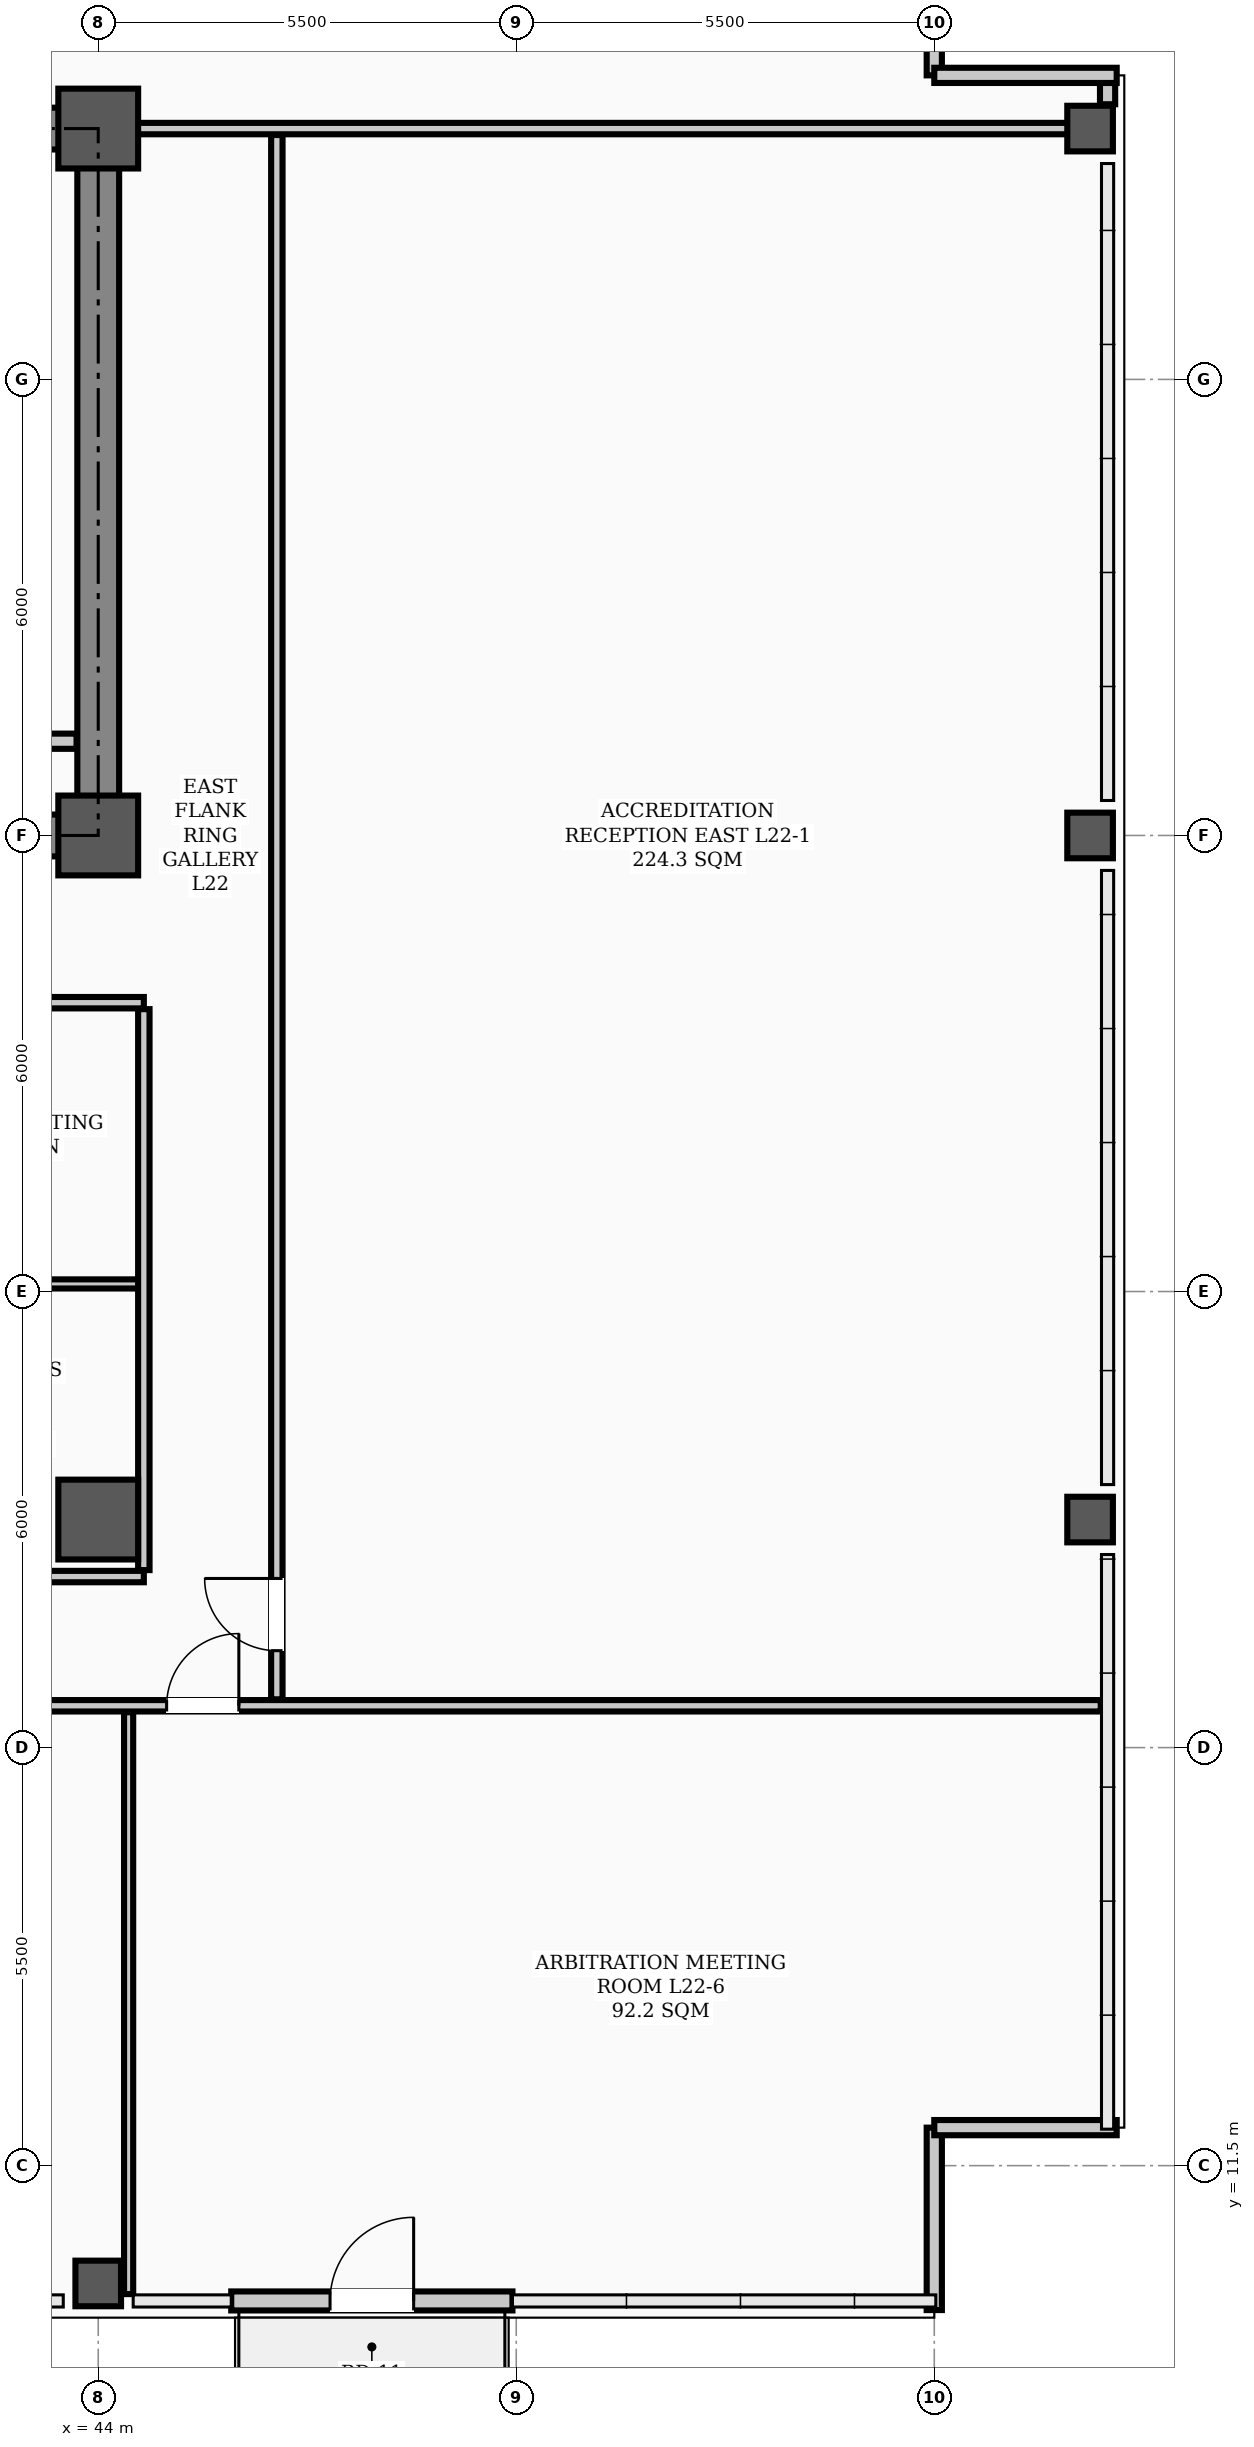
"""IFC4 building model, lengths in metres.
Left out: names, types, materials, properties, quantities, classifications, styles, units other than length and angle.
Written with IfcOpenShell. Run it as: python <this file> out.ifc"""

import sys

from ifc_helpers import new_model, si_unit, direction, frame, frame_2d, origin, origin_2d, place, context, subcontext, project, spatial, rectangle, hollow_rectangle, extrude, element, fill, save


model = new_model("IFC4")
c1 = context("Model", 3, precision=1e-05, world=origin(), true_north=direction((0.0, 1.0)))
c2 = subcontext(c1, "Body", "Model", "MODEL_VIEW")
j1 = project(units=[si_unit("LENGTHUNIT", "METRE"), si_unit("PLANEANGLEUNIT", "RADIAN")], contexts=[c1])
p1 = place(None, origin())
s1 = spatial("IfcSite", under=j1, at=p1, CompositionType="ELEMENT")
p2 = place(p1, origin())
s2 = spatial("IfcBuilding", under=s1, at=p2, CompositionType="ELEMENT")
p3 = place(p2, frame((0.0, 0.0, 88.9)))
s3 = spatial("IfcBuildingStorey", under=s2, at=p3, CompositionType="ELEMENT", Elevation=88.9)
for number, where, z_axis, x_axis in (
    (1, (44.0, 29.0, 0.0), (0.0, 0.0, 1.0), (1.0, 0.0, 0.0)),
    (2, (44.0, 38.3, 0.0), (0.0, 0.0, 1.0), (1.0, 0.0, 0.0)),
    (3, (44.0, 20.0, 0.0), (0.0, 0.0, 1.0), (1.0, 0.0, 0.0)),
):
    element("IfcColumn", number, at=place(p3, frame(where, z_axis=z_axis, x_axis=x_axis)), inside=s3, PredefinedType="COLUMN", context=c2, shape_type="SweptSolid", body=[
        extrude(hollow_rectangle(XDim=1.05, YDim=1.05, WallThickness=0.038, InnerFilletRadius=0.019, OuterFilletRadius=0.057, at=origin_2d()), origin(), (0.0, 0.0, 1.0), 3.9),
    ])
for number, where, z_axis, x_axis in (
    (4, (44.0, 9.95, 0.0), (0.0, 0.0, 1.0), (1.0, 0.0, 0.0)),
    (5, (57.05, 20.0, 0.0), (0.0, 0.0, 1.0), (1.0, 0.0, 0.0)),
    (6, (57.05, 29.0, 0.0), (0.0, 0.0, 1.0), (1.0, 0.0, 0.0)),
    (7, (57.05, 38.3, 0.0), (0.0, 0.0, 1.0), (1.0, 0.0, 0.0)),
):
    element("IfcColumn", number, at=place(p3, frame(where, z_axis=z_axis, x_axis=x_axis)), inside=s3, PredefinedType="COLUMN", context=c2, shape_type="SweptSolid", body=[
        extrude(hollow_rectangle(XDim=0.6, YDim=0.6, WallThickness=0.026, InnerFilletRadius=0.013, OuterFilletRadius=0.039, at=origin_2d()), origin(), (0.0, 0.0, 1.0), 3.9),
    ])
p4 = place(p3, frame((57.28, 38.62, 0.0), z_axis=(0.0, 0.0, 1.0), x_axis=(0.0, 1.0, 0.0)))
e8 = element("IfcWall", 8, at=p4, inside=s3, PredefinedType="PARAPET", context=c2, shape_type="SweptSolid", body=[
    extrude(rectangle(XDim=0.28, YDim=0.2, at=frame_2d((0.14, 0.0))), origin(), (0.0, 0.0, 1.0), 1.2),
])
for number, where, z_axis, x_axis in (
    (9, (55.0, 9.6, 0.0), (0.0, 0.0, 1.0), (0.0, 1.0, 0.0)),
    (10, (55.0, 12.0, 0.0), (0.0, 0.0, 1.0), (1.0, 0.0, 0.0)),
    (11, (55.0, 41.4, 0.0), (0.0, 0.0, 1.0), (0.0, -1.0, 0.0)),
    (12, (55.0, 39.0, 0.0), (0.0, 0.0, 1.0), (1.0, 0.0, 0.0)),
):
    element("IfcWall", number, at=place(p3, frame(where, z_axis=z_axis, x_axis=x_axis)), inside=s3, PredefinedType="PARAPET", context=c2, shape_type="SweptSolid", body=[
        extrude(rectangle(XDim=2.4, YDim=0.2, at=frame_2d((1.2, 0.0))), origin(), (0.0, 0.0, 1.0), 1.2),
    ])
p5 = place(p3, frame((45.75, 9.72, 0.0), z_axis=(0.0, 0.0, 1.0), x_axis=(1.0, 0.0, 0.0)))
e13 = element("IfcWall", 13, at=p5, inside=s3, PredefinedType="STANDARD", context=c2, shape_type="SweptSolid", body=[
    extrude(rectangle(XDim=3.7, YDim=0.25, at=frame_2d((1.85, 0.0))), origin(), (0.0, 0.0, 1.0), 3.18),
])
p6 = place(p5, frame((1.3, 0.0, 0.0)))
e14 = element("IfcOpeningElement", 14, at=p6, cuts=e13, PredefinedType="OPENING", context=c2, shape_type="SweptSolid", body=[
    extrude(rectangle(XDim=1.1, YDim=2.2, at=frame_2d((0.55, 1.1))), frame((0.0, 0.135, 0.0), z_axis=(0.0, -1.0, 0.0), x_axis=(1.0, 0.0, 0.0)), (0.0, 0.0, 1.0), 0.27),
])
p7 = place(p3, frame((13.5, 29.0, 0.0), z_axis=(0.0, 0.0, 1.0), x_axis=(1.0, 0.0, 0.0)))
e15 = element("IfcWall", 15, at=p7, inside=s3, PredefinedType="SHEAR", context=c2, shape_type="SweptSolid", body=[
    extrude(rectangle(XDim=30.5, YDim=0.55, at=frame_2d((15.25, 0.0))), origin(), (0.0, 0.0, 1.0), 3.72),
])
p8 = place(p7, frame((1.75, 0.0, 0.0)))
e16 = element("IfcOpeningElement", 16, at=p8, cuts=e15, PredefinedType="OPENING", context=c2, shape_type="SweptSolid", body=[
    extrude(rectangle(XDim=1.1, YDim=2.08, at=frame_2d((0.55, 1.04))), frame((0.0, 0.285, 0.0), z_axis=(0.0, -1.0, 0.0), x_axis=(1.0, 0.0, 0.0)), (0.0, 0.0, 1.0), 0.57),
])
p9 = place(p7, frame((26.7, 0.0, 0.0)))
e17 = element("IfcOpeningElement", 17, at=p9, cuts=e15, PredefinedType="OPENING", context=c2, shape_type="SweptSolid", body=[
    extrude(rectangle(XDim=1.1, YDim=2.08, at=frame_2d((0.55, 1.04))), frame((0.0, 0.285, 0.0), z_axis=(0.0, -1.0, 0.0), x_axis=(1.0, 0.0, 0.0)), (0.0, 0.0, 1.0), 0.57),
])
p10 = place(p7, frame((6.8, 0.0, 0.0)))
e18 = element("IfcOpeningElement", 18, at=p10, cuts=e15, PredefinedType="OPENING", context=c2, shape_type="SweptSolid", body=[
    extrude(rectangle(XDim=1.1, YDim=2.08, at=frame_2d((0.55, 1.04))), frame((0.0, 0.285, 0.0), z_axis=(0.0, -1.0, 0.0), x_axis=(1.0, 0.0, 0.0)), (0.0, 0.0, 1.0), 0.57),
])
p11 = place(p7, frame((13.2, 0.0, 0.0)))
e19 = element("IfcOpeningElement", 19, at=p11, cuts=e15, PredefinedType="OPENING", context=c2, shape_type="SweptSolid", body=[
    extrude(rectangle(XDim=1.6, YDim=2.08, at=frame_2d((0.8, 1.04))), frame((0.0, 0.285, 0.0), z_axis=(0.0, -1.0, 0.0), x_axis=(1.0, 0.0, 0.0)), (0.0, 0.0, 1.0), 0.57),
])
p12 = place(p7, frame((20.525, 0.0, 0.0)))
e20 = element("IfcOpeningElement", 20, at=p12, cuts=e15, PredefinedType="OPENING", context=c2, shape_type="SweptSolid", body=[
    extrude(rectangle(XDim=0.95, YDim=2.08, at=frame_2d((0.475, 1.04))), frame((0.0, 0.285, 0.0), z_axis=(0.0, -1.0, 0.0), x_axis=(1.0, 0.0, 0.0)), (0.0, 0.0, 1.0), 0.57),
])
p13 = place(p3, frame((13.5, 38.3, 0.0), z_axis=(0.0, 0.0, 1.0), x_axis=(1.0, 0.0, 0.0)))
e21 = element("IfcWall", 21, at=p13, inside=s3, PredefinedType="SHEAR", context=c2, shape_type="SweptSolid", body=[
    extrude(rectangle(XDim=30.5, YDim=0.55, at=frame_2d((15.25, 0.0))), origin(), (0.0, 0.0, 1.0), 3.72),
])
p14 = place(p3, frame((44.0, 29.35, 0.0), z_axis=(0.0, 0.0, 1.0), x_axis=(0.0, 1.0, 0.0)))
e22 = element("IfcWall", 22, at=p14, inside=s3, PredefinedType="SHEAR", context=c2, shape_type="SweptSolid", body=[
    extrude(rectangle(XDim=8.6, YDim=0.55, at=frame_2d((4.3, 0.0))), origin(), (0.0, 0.0, 1.0), 3.72),
])
p15 = place(p3, frame((42.4, 30.24, 0.0), z_axis=(0.0, 0.0, 1.0), x_axis=(1.0, 0.0, 0.0)))
e23 = element("IfcWall", 23, at=p15, inside=s3, PredefinedType="STANDARD", context=c2, shape_type="SweptSolid", body=[
    extrude(rectangle(XDim=1.315, YDim=0.2, at=frame_2d((0.658, 0.0))), origin(), (0.0, 0.0, 1.0), 3.1),
])
p16 = place(p3, frame((12.9, 26.8, 0.0), z_axis=(0.0, 0.0, 1.0), x_axis=(1.0, 0.0, 0.0)))
e24 = element("IfcWall", 24, at=p16, inside=s3, PredefinedType="PARTITIONING", context=c2, shape_type="SweptSolid", body=[
    extrude(rectangle(XDim=31.7, YDim=0.15, at=frame_2d((15.85, 0.0))), origin(), (0.0, 0.0, 1.0), 3.1),
])
p17 = place(p16, frame((13.6, 0.0, 0.0)))
e25 = element("IfcOpeningElement", 25, at=p17, cuts=e24, PredefinedType="OPENING", context=c2, shape_type="SweptSolid", body=[
    extrude(rectangle(XDim=1.6, YDim=2.08, at=frame_2d((0.8, 1.04))), frame((0.0, 0.085, 0.0), z_axis=(0.0, -1.0, 0.0), x_axis=(1.0, 0.0, 0.0)), (0.0, 0.0, 1.0), 0.17),
])
p18 = place(p16, frame((3.275, 0.0, 0.0)))
e26 = element("IfcOpeningElement", 26, at=p18, cuts=e24, PredefinedType="OPENING", context=c2, shape_type="SweptSolid", body=[
    extrude(rectangle(XDim=0.95, YDim=2.08, at=frame_2d((0.475, 1.04))), frame((0.0, 0.085, 0.0), z_axis=(0.0, -1.0, 0.0), x_axis=(1.0, 0.0, 0.0)), (0.0, 0.0, 1.0), 0.17),
])
p19 = place(p16, frame((9.025, 0.0, 0.0)))
e27 = element("IfcOpeningElement", 27, at=p19, cuts=e24, PredefinedType="OPENING", context=c2, shape_type="SweptSolid", body=[
    extrude(rectangle(XDim=0.95, YDim=2.08, at=frame_2d((0.475, 1.04))), frame((0.0, 0.085, 0.0), z_axis=(0.0, -1.0, 0.0), x_axis=(1.0, 0.0, 0.0)), (0.0, 0.0, 1.0), 0.17),
])
p20 = place(p16, frame((19.525, 0.0, 0.0)))
e28 = element("IfcOpeningElement", 28, at=p20, cuts=e24, PredefinedType="OPENING", context=c2, shape_type="SweptSolid", body=[
    extrude(rectangle(XDim=0.95, YDim=2.08, at=frame_2d((0.475, 1.04))), frame((0.0, 0.085, 0.0), z_axis=(0.0, -1.0, 0.0), x_axis=(1.0, 0.0, 0.0)), (0.0, 0.0, 1.0), 0.17),
])
p21 = place(p16, frame((26.725, 0.0, 0.0)))
e29 = element("IfcOpeningElement", 29, at=p21, cuts=e24, PredefinedType="OPENING", context=c2, shape_type="SweptSolid", body=[
    extrude(rectangle(XDim=0.95, YDim=2.08, at=frame_2d((0.475, 1.04))), frame((0.0, 0.085, 0.0), z_axis=(0.0, -1.0, 0.0), x_axis=(1.0, 0.0, 0.0)), (0.0, 0.0, 1.0), 0.17),
])
p22 = place(p3, frame((7.81, 17.55, 0.0), z_axis=(0.0, 0.0, 1.0), x_axis=(1.0, 0.0, 0.0)))
e30 = element("IfcWall", 30, at=p22, inside=s3, PredefinedType="PARTITIONING", context=c2, shape_type="SweptSolid", body=[
    extrude(rectangle(XDim=49.38, YDim=0.15, at=frame_2d((24.69, 0.0))), origin(), (0.0, 0.0, 1.0), 3.1),
])
p23 = place(p22, frame((7.465, 0.0, 0.0)))
e31 = element("IfcOpeningElement", 31, at=p23, cuts=e30, PredefinedType="OPENING", context=c2, shape_type="SweptSolid", body=[
    extrude(rectangle(XDim=0.95, YDim=2.08, at=frame_2d((0.475, 1.04))), frame((0.0, 0.085, 0.0), z_axis=(0.0, -1.0, 0.0), x_axis=(1.0, 0.0, 0.0)), (0.0, 0.0, 1.0), 0.17),
])
p24 = place(p22, frame((11.915, 0.0, 0.0)))
e32 = element("IfcOpeningElement", 32, at=p24, cuts=e30, PredefinedType="OPENING", context=c2, shape_type="SweptSolid", body=[
    extrude(rectangle(XDim=0.95, YDim=2.08, at=frame_2d((0.475, 1.04))), frame((0.0, 0.085, 0.0), z_axis=(0.0, -1.0, 0.0), x_axis=(1.0, 0.0, 0.0)), (0.0, 0.0, 1.0), 0.17),
])
p25 = place(p22, frame((18.915, 0.0, 0.0)))
e33 = element("IfcOpeningElement", 33, at=p25, cuts=e30, PredefinedType="OPENING", context=c2, shape_type="SweptSolid", body=[
    extrude(rectangle(XDim=0.95, YDim=2.08, at=frame_2d((0.475, 1.04))), frame((0.0, 0.085, 0.0), z_axis=(0.0, -1.0, 0.0), x_axis=(1.0, 0.0, 0.0)), (0.0, 0.0, 1.0), 0.17),
])
p26 = place(p22, frame((26.015, 0.0, 0.0)))
e34 = element("IfcOpeningElement", 34, at=p26, cuts=e30, PredefinedType="OPENING", context=c2, shape_type="SweptSolid", body=[
    extrude(rectangle(XDim=0.95, YDim=2.08, at=frame_2d((0.475, 1.04))), frame((0.0, 0.085, 0.0), z_axis=(0.0, -1.0, 0.0), x_axis=(1.0, 0.0, 0.0)), (0.0, 0.0, 1.0), 0.17),
])
p27 = place(p22, frame((32.815, 0.0, 0.0)))
e35 = element("IfcOpeningElement", 35, at=p27, cuts=e30, PredefinedType="OPENING", context=c2, shape_type="SweptSolid", body=[
    extrude(rectangle(XDim=0.95, YDim=2.08, at=frame_2d((0.475, 1.04))), frame((0.0, 0.085, 0.0), z_axis=(0.0, -1.0, 0.0), x_axis=(1.0, 0.0, 0.0)), (0.0, 0.0, 1.0), 0.17),
])
p28 = place(p22, frame((37.09, 0.0, 0.0)))
e36 = element("IfcOpeningElement", 36, at=p28, cuts=e30, PredefinedType="OPENING", context=c2, shape_type="SweptSolid", body=[
    extrude(rectangle(XDim=0.95, YDim=2.08, at=frame_2d((0.475, 1.04))), frame((0.0, 0.085, 0.0), z_axis=(0.0, -1.0, 0.0), x_axis=(1.0, 0.0, 0.0)), (0.0, 0.0, 1.0), 0.17),
])
p29 = place(p3, frame((28.4, 19.25, 0.0), z_axis=(0.0, 0.0, 1.0), x_axis=(1.0, 0.0, 0.0)))
e37 = element("IfcWall", 37, at=p29, inside=s3, PredefinedType="PARTITIONING", context=c2, shape_type="SweptSolid", body=[
    extrude(rectangle(XDim=16.2, YDim=0.15, at=frame_2d((8.1, 0.0))), origin(), (0.0, 0.0, 1.0), 3.1),
])
p30 = place(p29, frame((4.025, 0.0, 0.0)))
e38 = element("IfcOpeningElement", 38, at=p30, cuts=e37, PredefinedType="OPENING", context=c2, shape_type="SweptSolid", body=[
    extrude(rectangle(XDim=0.95, YDim=2.08, at=frame_2d((0.475, 1.04))), frame((0.0, 0.085, 0.0), z_axis=(0.0, -1.0, 0.0), x_axis=(1.0, 0.0, 0.0)), (0.0, 0.0, 1.0), 0.17),
])
p31 = place(p29, frame((11.225, 0.0, 0.0)))
e39 = element("IfcOpeningElement", 39, at=p31, cuts=e37, PredefinedType="OPENING", context=c2, shape_type="SweptSolid", body=[
    extrude(rectangle(XDim=0.95, YDim=2.08, at=frame_2d((0.475, 1.04))), frame((0.0, 0.085, 0.0), z_axis=(0.0, -1.0, 0.0), x_axis=(1.0, 0.0, 0.0)), (0.0, 0.0, 1.0), 0.17),
])
p32 = place(p3, frame((44.0, 38.3, 0.0), z_axis=(0.0, 0.0, 1.0), x_axis=(1.0, 0.0, 0.0)))
e40 = element("IfcWall", 40, at=p32, inside=s3, PredefinedType="PARTITIONING", context=c2, shape_type="SweptSolid", body=[
    extrude(rectangle(XDim=13.19, YDim=0.15, at=frame_2d((6.595, 0.0))), origin(), (0.0, 0.0, 1.0), 3.0),
])
p33 = place(p3, frame((35.6, 23.1, 0.0), z_axis=(0.0, 0.0, 1.0), x_axis=(1.0, 0.0, 0.0)))
e41 = element("IfcWall", 41, at=p33, inside=s3, PredefinedType="PARTITIONING", context=c2, shape_type="SweptSolid", body=[
    extrude(rectangle(XDim=9.0, YDim=0.12, at=frame_2d((4.5, 0.0))), origin(), (0.0, 0.0, 1.0), 3.1),
])
p34 = place(p3, frame((46.35, 17.635, 0.0), z_axis=(0.0, 0.0, 1.0), x_axis=(0.0, 1.0, 0.0)))
e42 = element("IfcWall", 42, at=p34, inside=s3, PredefinedType="PARTITIONING", context=c2, shape_type="SweptSolid", body=[
    extrude(rectangle(XDim=20.58, YDim=0.15, at=frame_2d((10.29, 0.0))), origin(), (0.0, 0.0, 1.0), 3.0),
])
p35 = place(p34, frame((0.64, 0.0, 0.0)))
e43 = element("IfcOpeningElement", 43, at=p35, cuts=e42, PredefinedType="OPENING", context=c2, shape_type="SweptSolid", body=[
    extrude(rectangle(XDim=0.95, YDim=2.08, at=frame_2d((0.475, 1.04))), frame((0.0, 0.085, 0.0), z_axis=(0.0, -1.0, 0.0), x_axis=(1.0, 0.0, 0.0)), (0.0, 0.0, 1.0), 0.17),
])
p36 = place(p3, frame((44.6, 19.335, 0.0), z_axis=(0.0, 0.0, 1.0), x_axis=(0.0, 1.0, 0.0)))
e44 = element("IfcWall", 44, at=p36, inside=s3, PredefinedType="PARTITIONING", context=c2, shape_type="SweptSolid", body=[
    extrude(rectangle(XDim=7.38, YDim=0.15, at=frame_2d((3.69, 0.0))), origin(), (0.0, 0.0, 1.0), 3.0),
])
p37 = place(p3, frame((44.4, 9.81, 0.0), z_axis=(0.0, 0.0, 1.0), x_axis=(0.0, 1.0, 0.0)))
e45 = element("IfcWall", 45, at=p37, inside=s3, PredefinedType="PARTITIONING", context=c2, shape_type="SweptSolid", body=[
    extrude(rectangle(XDim=7.655, YDim=0.12, at=frame_2d((3.828, 0.0))), origin(), (0.0, 0.0, 1.0), 3.1),
])
p38 = place(p6, origin())
e46 = element("IfcDoor", 46, at=p38, inside=s3, OperationType="SINGLE_SWING_RIGHT", PredefinedType="DOOR", context=c2, shape_type="SweptSolid", body=[
    extrude(rectangle(XDim=1.1, YDim=2.2, at=frame_2d((0.55, 1.1))), frame((0.0, 0.025, 0.0), z_axis=(0.0, -1.0, 0.0), x_axis=(1.0, 0.0, 0.0)), (0.0, 0.0, 1.0), 0.05),
])
fill(e14, e46)
p39 = place(p28, origin())
e47 = element("IfcDoor", 47, at=p39, inside=s3, OperationType="SINGLE_SWING_RIGHT", PredefinedType="DOOR", context=c2, shape_type="SweptSolid", body=[
    extrude(rectangle(XDim=0.95, YDim=2.08, at=frame_2d((0.475, 1.04))), frame((0.0, 0.025, 0.0), z_axis=(0.0, -1.0, 0.0), x_axis=(1.0, 0.0, 0.0)), (0.0, 0.0, 1.0), 0.05),
])
fill(e36, e47)
p40 = place(p35, origin())
e48 = element("IfcDoor", 48, at=p40, inside=s3, OperationType="SINGLE_SWING_RIGHT", PredefinedType="DOOR", context=c2, shape_type="SweptSolid", body=[
    extrude(rectangle(XDim=0.95, YDim=2.08, at=frame_2d((0.475, 1.04))), frame((0.0, 0.025, 0.0), z_axis=(0.0, -1.0, 0.0), x_axis=(1.0, 0.0, 0.0)), (0.0, 0.0, 1.0), 0.05),
])
fill(e43, e48)
save(model, sys.argv[1])
